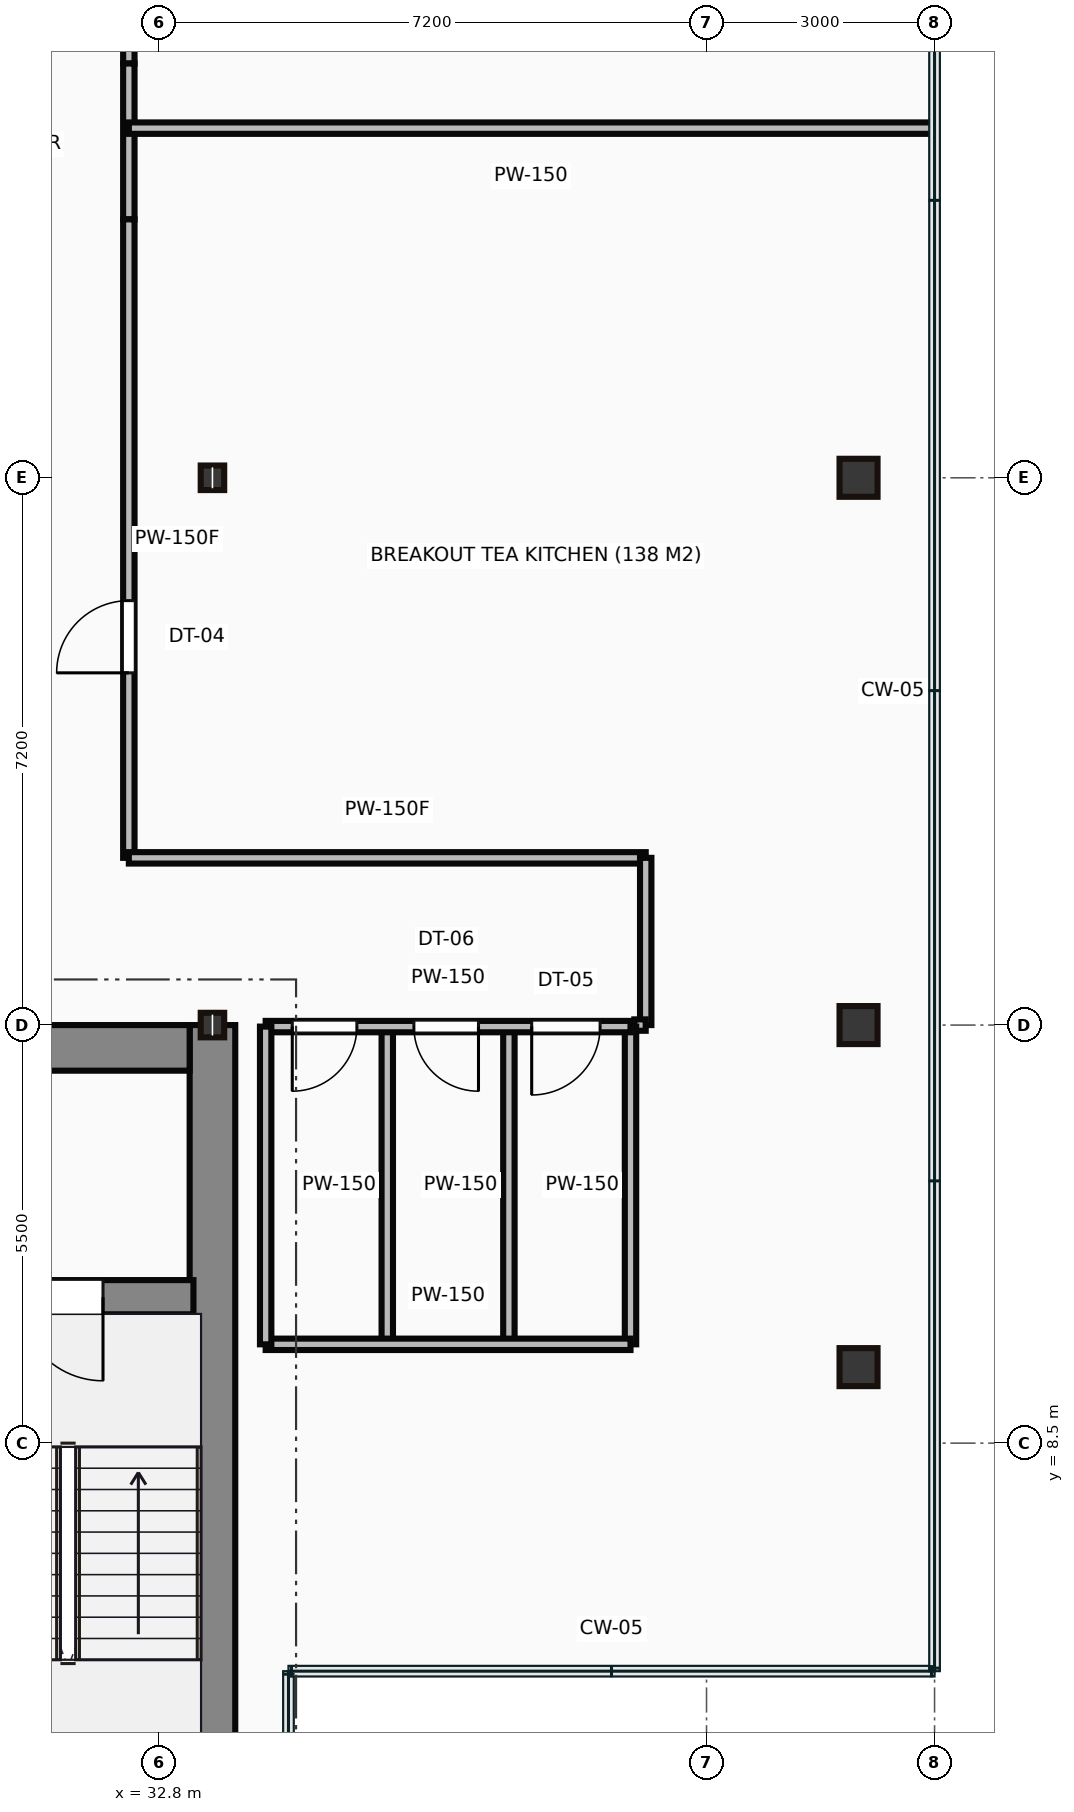
"""IFC4 building model, lengths in metres.
Left out: names, types, materials, properties, quantities, classifications, styles, units other than length and angle.
Written with IfcOpenShell. Run it as: python <this file> out.ifc"""

import sys

from ifc_helpers import new_model, si_unit, direction, frame, frame_2d, origin, origin_2d, place, context, subcontext, project, spatial, rectangle, hollow_rectangle, i_section, extrude, source, transform, mapped, element, fill, save


model = new_model("IFC4")
c1 = context("Model", 3, precision=1e-05, world=origin(), true_north=direction((0.0, 1.0)))
c2 = subcontext(c1, "Body", "Model", "MODEL_VIEW")
j1 = project(units=[si_unit("LENGTHUNIT", "METRE"), si_unit("PLANEANGLEUNIT", "RADIAN")], contexts=[c1])
p1 = place(None, origin())
s1 = spatial("IfcSite", under=j1, at=p1, CompositionType="ELEMENT")
p2 = place(p1, origin())
s2 = spatial("IfcBuilding", under=s1, at=p2, CompositionType="ELEMENT")
p3 = place(p2, frame((0.0, 0.0, 199.55)))
s3 = spatial("IfcBuildingStorey", under=s2, at=p3, CompositionType="ELEMENT", Elevation=199.55)
m1 = source(origin(), c2, "Body", "SweptSolid", [
    extrude(rectangle(XDim=13.1, YDim=0.6, at=frame_2d((6.55, 0.0))), origin(), (0.0, 0.0, 1.0), 3.65),
])
p4 = place(p3, frame((33.5, 0.9, 0.0), z_axis=(0.0, 0.0, 1.0), x_axis=(0.0, 1.0, 0.0)))
e1 = element("IfcWall", 1, at=p4, inside=s3, PredefinedType="SHEAR", context=c2, shape_type="MappedRepresentation", body=[
    mapped(m1, transform((0.0, 0.0, 0.0))),
])
m2 = source(origin(), c2, "Body", "SweptSolid", [
    extrude(rectangle(XDim=12.6, YDim=0.6, at=frame_2d((6.3, 0.0))), origin(), (0.0, 0.0, 1.0), 3.65),
])
p5 = place(p3, frame((20.6, 13.7, 0.0), z_axis=(0.0, 0.0, 1.0), x_axis=(1.0, 0.0, 0.0)))
e2 = element("IfcWall", 2, at=p5, inside=s3, PredefinedType="SHEAR", context=c2, shape_type="MappedRepresentation", body=[
    mapped(m2, transform((0.0, 0.0, 0.0))),
])
p6 = place(p5, frame((9.25, 0.0, 0.0)))
e3 = element("IfcOpeningElement", 3, at=p6, cuts=e2, PredefinedType="OPENING", context=c2, shape_type="SweptSolid", body=[
    extrude(rectangle(XDim=1.1, YDim=2.15, at=frame_2d((0.55, 1.075))), frame((0.0, 0.31, 0.0), z_axis=(0.0, -1.0, 0.0), x_axis=(1.0, 0.0, 0.0)), (0.0, 0.0, 1.0), 0.62),
])
m3 = source(origin(), c2, "Body", "SweptSolid", [
    extrude(rectangle(XDim=3.39, YDim=0.45, at=frame_2d((1.695, 0.0))), origin(), (0.0, 0.0, 1.0), 3.65),
])
p7 = place(p3, frame((29.86, 10.42, 0.0), z_axis=(0.0, 0.0, 1.0), x_axis=(1.0, 0.0, 0.0)))
e4 = element("IfcWall", 4, at=p7, inside=s3, PredefinedType="SHEAR", context=c2, shape_type="MappedRepresentation", body=[
    mapped(m3, transform((0.0, 0.0, 0.0))),
])
p8 = place(p7, frame((1.1, 0.0, 0.0)))
e5 = element("IfcOpeningElement", 5, at=p8, cuts=e4, PredefinedType="OPENING", context=c2, shape_type="SweptSolid", body=[
    extrude(rectangle(XDim=1.1, YDim=2.15, at=frame_2d((0.55, 1.075))), frame((0.0, 0.235, 0.0), z_axis=(0.0, -1.0, 0.0), x_axis=(1.0, 0.0, 0.0)), (0.0, 0.0, 1.0), 0.47),
])
m4 = source(origin(), c2, "Body", "SweptSolid", [
    extrude(i_section(OverallWidth=0.309, OverallDepth=0.323, WebThickness=0.014, FlangeThickness=0.023, at=origin_2d()), origin(), (0.0, 0.0, 1.0), 3.65),
])
for number, where, z_axis, x_axis in (
    (6, (33.5, 14.0, 0.0), (0.0, 0.0, 1.0), (1.0, 0.0, 0.0)),
    (7, (33.5, 21.2, 0.0), (0.0, 0.0, 1.0), (1.0, 0.0, 0.0)),
):
    element("IfcColumn", number, at=place(p3, frame(where, z_axis=z_axis, x_axis=x_axis)), inside=s3, PredefinedType="COLUMN", context=c2, shape_type="MappedRepresentation", body=[
        mapped(m4, transform((0.0, 0.0, 0.0))),
    ])
m5 = source(origin(), c2, "Body", "SweptSolid", [
    extrude(hollow_rectangle(XDim=0.5, YDim=0.5, WallThickness=0.022, at=origin_2d()), origin(), (0.0, 0.0, 1.0), 3.65),
])
for number, where, z_axis, x_axis in (
    (8, (42.0, 9.5, 0.0), (0.0, 0.0, 1.0), (1.0, 0.0, 0.0)),
    (9, (42.0, 14.0, 0.0), (0.0, 0.0, 1.0), (1.0, 0.0, 0.0)),
    (10, (42.0, 21.2, 0.0), (0.0, 0.0, 1.0), (1.0, 0.0, 0.0)),
):
    element("IfcColumn", number, at=place(p3, frame(where, z_axis=z_axis, x_axis=x_axis)), inside=s3, PredefinedType="COLUMN", context=c2, shape_type="MappedRepresentation", body=[
        mapped(m5, transform((0.0, 0.0, 0.0))),
    ])
m6 = source(origin(), c2, "Body", "SweptSolid", [
    extrude(rectangle(XDim=4.8, YDim=0.15, at=frame_2d((2.4, 0.0))), origin(), (0.0, 0.0, 1.0), 2.787),
])
p9 = place(p3, frame((34.2, 13.98, 0.0), z_axis=(0.0, 0.0, 1.0), x_axis=(1.0, 0.0, 0.0)))
e11 = element("IfcWall", 11, at=p9, inside=s3, PredefinedType="PARTITIONING", context=c2, shape_type="MappedRepresentation", body=[
    mapped(m6, transform((0.0, 0.0, 0.0))),
])
p10 = place(p9, frame((0.35, 0.0, 0.0)))
e12 = element("IfcOpeningElement", 12, at=p10, cuts=e11, PredefinedType="OPENING", context=c2, shape_type="SweptSolid", body=[
    extrude(rectangle(XDim=0.85, YDim=2.1, at=frame_2d((0.425, 1.05))), frame((0.0, 0.085, 0.0), z_axis=(0.0, -1.0, 0.0), x_axis=(1.0, 0.0, 0.0)), (0.0, 0.0, 1.0), 0.17),
])
p11 = place(p9, frame((1.95, 0.0, 0.0)))
e13 = element("IfcOpeningElement", 13, at=p11, cuts=e11, PredefinedType="OPENING", context=c2, shape_type="SweptSolid", body=[
    extrude(rectangle(XDim=0.85, YDim=2.1, at=frame_2d((0.425, 1.05))), frame((0.0, 0.085, 0.0), z_axis=(0.0, -1.0, 0.0), x_axis=(1.0, 0.0, 0.0)), (0.0, 0.0, 1.0), 0.17),
])
p12 = place(p9, frame((3.5, 0.0, 0.0)))
e14 = element("IfcOpeningElement", 14, at=p12, cuts=e11, PredefinedType="OPENING", context=c2, shape_type="SweptSolid", body=[
    extrude(rectangle(XDim=0.9, YDim=2.1, at=frame_2d((0.45, 1.05))), frame((0.0, 0.085, 0.0), z_axis=(0.0, -1.0, 0.0), x_axis=(1.0, 0.0, 0.0)), (0.0, 0.0, 1.0), 0.17),
])
m7 = source(origin(), c2, "Body", "SweptSolid", [
    extrude(rectangle(XDim=4.8, YDim=0.15, at=frame_2d((2.4, 0.0))), origin(), (0.0, 0.0, 1.0), 3.4),
])
p13 = place(p3, frame((34.2, 9.8, 0.0), z_axis=(0.0, 0.0, 1.0), x_axis=(1.0, 0.0, 0.0)))
e15 = element("IfcWall", 15, at=p13, inside=s3, PredefinedType="PARTITIONING", context=c2, shape_type="MappedRepresentation", body=[
    mapped(m7, transform((0.0, 0.0, 0.0))),
])
m8 = source(origin(), c2, "Body", "SweptSolid", [
    extrude(rectangle(XDim=4.18, YDim=0.15, at=frame_2d((2.09, 0.0))), origin(), (0.0, 0.0, 1.0), 3.4),
])
for number, where, z_axis, x_axis in (
    (16, (39.0, 9.8, 0.0), (0.0, 0.0, 1.0), (0.0, 1.0, 0.0)),
    (17, (34.2, 9.8, 0.0), (0.0, 0.0, 1.0), (0.0, 1.0, 0.0)),
    (18, (35.8, 9.8, 0.0), (0.0, 0.0, 1.0), (0.0, 1.0, 0.0)),
    (19, (37.4, 9.8, 0.0), (0.0, 0.0, 1.0), (0.0, 1.0, 0.0)),
):
    element("IfcWall", number, at=place(p3, frame(where, z_axis=z_axis, x_axis=x_axis)), inside=s3, PredefinedType="PARTITIONING", context=c2, shape_type="MappedRepresentation", body=[
        mapped(m8, transform((0.0, 0.0, 0.0))),
    ])
m9 = source(origin(), c2, "Body", "SweptSolid", [
    extrude(rectangle(XDim=6.55, YDim=0.15, at=frame_2d((3.275, 0.0))), origin(), (0.0, 0.0, 1.0), 3.4),
])
p14 = place(p3, frame((32.4, 33.2, 0.0), z_axis=(0.0, 0.0, 1.0), x_axis=(0.0, -1.0, 0.0)))
e20 = element("IfcWall", 20, at=p14, inside=s3, PredefinedType="PARTITIONING", context=c2, shape_type="MappedRepresentation", body=[
    mapped(m9, transform((0.0, 0.0, 0.0))),
])
p15 = place(p14, frame((2.8, 0.0, 0.0)))
e21 = element("IfcOpeningElement", 21, at=p15, cuts=e20, PredefinedType="OPENING", context=c2, shape_type="SweptSolid", body=[
    extrude(rectangle(XDim=0.95, YDim=2.15, at=frame_2d((0.475, 1.075))), frame((0.0, 0.085, 0.0), z_axis=(0.0, -1.0, 0.0), x_axis=(1.0, 0.0, 0.0)), (0.0, 0.0, 1.0), 0.17),
])
m10 = source(origin(), c2, "Body", "SweptSolid", [
    extrude(rectangle(XDim=2.05, YDim=0.15, at=frame_2d((1.025, 0.0))), origin(), (0.0, 0.0, 1.0), 3.4),
])
p16 = place(p3, frame((32.4, 26.65, 0.0), z_axis=(0.0, 0.0, 1.0), x_axis=(0.0, -1.0, 0.0)))
e22 = element("IfcWall", 22, at=p16, inside=s3, PredefinedType="PARTITIONING", context=c2, shape_type="MappedRepresentation", body=[
    mapped(m10, transform((0.0, 0.0, 0.0))),
])
m11 = source(origin(), c2, "Body", "SweptSolid", [
    extrude(rectangle(XDim=8.4, YDim=0.15, at=frame_2d((4.2, 0.0))), origin(), (0.0, 0.0, 1.0), 3.4),
])
p17 = place(p3, frame((32.4, 24.6, 0.0), z_axis=(0.0, 0.0, 1.0), x_axis=(0.0, -1.0, 0.0)))
e23 = element("IfcWall", 23, at=p17, inside=s3, PredefinedType="PARTITIONING", context=c2, shape_type="MappedRepresentation", body=[
    mapped(m11, transform((0.0, 0.0, 0.0))),
])
p18 = place(p17, frame((5.016, 0.0, 0.0)))
e24 = element("IfcOpeningElement", 24, at=p18, cuts=e23, PredefinedType="OPENING", context=c2, shape_type="SweptSolid", body=[
    extrude(rectangle(XDim=0.95, YDim=2.15, at=frame_2d((0.475, 1.075))), frame((0.0, 0.085, 0.0), z_axis=(0.0, -1.0, 0.0), x_axis=(1.0, 0.0, 0.0)), (0.0, 0.0, 1.0), 0.17),
])
m12 = source(origin(), c2, "Body", "SweptSolid", [
    extrude(rectangle(XDim=6.8, YDim=0.15, at=frame_2d((3.4, 0.0))), origin(), (0.0, 0.0, 1.0), 3.4),
])
p19 = place(p3, frame((32.4, 16.2, 0.0), z_axis=(0.0, 0.0, 1.0), x_axis=(1.0, 0.0, 0.0)))
e25 = element("IfcWall", 25, at=p19, inside=s3, PredefinedType="PARTITIONING", context=c2, shape_type="MappedRepresentation", body=[
    mapped(m12, transform((0.0, 0.0, 0.0))),
])
m13 = source(origin(), c2, "Body", "SweptSolid", [
    extrude(rectangle(XDim=2.2, YDim=0.15, at=frame_2d((1.1, 0.0))), origin(), (0.0, 0.0, 1.0), 3.4),
])
p20 = place(p3, frame((39.2, 16.2, 0.0), z_axis=(0.0, 0.0, 1.0), x_axis=(0.0, -1.0, 0.0)))
e26 = element("IfcWall", 26, at=p20, inside=s3, PredefinedType="PARTITIONING", context=c2, shape_type="MappedRepresentation", body=[
    mapped(m13, transform((0.0, 0.0, 0.0))),
])
m14 = source(origin(), c2, "Body", "SweptSolid", [
    extrude(rectangle(XDim=0.15, YDim=0.15, at=frame_2d((0.075, 0.0))), origin(), (0.0, 0.0, 1.0), 3.4),
])
p21 = place(p3, frame((39.2, 14.0, 0.0), z_axis=(0.0, 0.0, 1.0), x_axis=(-1.0, 0.0, 0.0)))
e27 = element("IfcWall", 27, at=p21, inside=s3, PredefinedType="PARTITIONING", context=c2, shape_type="MappedRepresentation", body=[
    mapped(m14, transform((0.0, 0.0, 0.0))),
])
m15 = source(origin(), c2, "Body", "SweptSolid", [
    extrude(rectangle(XDim=10.58, YDim=0.15, at=frame_2d((5.29, 0.0))), origin(), (0.0, 0.0, 1.0), 3.4),
])
p22 = place(p3, frame((42.98, 25.8, 0.0), z_axis=(0.0, 0.0, 1.0), x_axis=(-1.0, 0.0, 0.0)))
e28 = element("IfcWall", 28, at=p22, inside=s3, PredefinedType="PARTITIONING", context=c2, shape_type="MappedRepresentation", body=[
    mapped(m15, transform((0.0, 0.0, 0.0))),
])
m16 = source(origin(), c2, "Body", "SweptSolid", [
    extrude(rectangle(XDim=1.1, YDim=2.15, at=frame_2d((0.55, 1.075))), frame((0.0, 0.025, 0.0), z_axis=(0.0, -1.0, 0.0), x_axis=(1.0, 0.0, 0.0)), (0.0, 0.0, 1.0), 0.05),
])
p23 = place(p8, frame((1.1, 0.0, 0.0), z_axis=(0.0, 0.0, 1.0), x_axis=(-1.0, 0.0, 0.0)))
e29 = element("IfcDoor", 29, at=p23, inside=s3, OperationType="SINGLE_SWING_RIGHT", PredefinedType="DOOR", context=c2, shape_type="MappedRepresentation", body=[
    mapped(m16, transform((0.0, 0.0, 0.0))),
])
fill(e5, e29)
m17 = source(origin(), c2, "Body", "SweptSolid", [
    extrude(rectangle(XDim=0.85, YDim=2.1, at=frame_2d((0.425, 1.05))), frame((0.0, 0.025, 0.0), z_axis=(0.0, -1.0, 0.0), x_axis=(1.0, 0.0, 0.0)), (0.0, 0.0, 1.0), 0.05),
])
p24 = place(p10, frame((0.85, 0.0, 0.0), z_axis=(0.0, 0.0, 1.0), x_axis=(-1.0, 0.0, 0.0)))
e30 = element("IfcDoor", 30, at=p24, inside=s3, OperationType="SINGLE_SWING_LEFT", PredefinedType="DOOR", context=c2, shape_type="MappedRepresentation", body=[
    mapped(m17, transform((0.0, 0.0, 0.0))),
])
fill(e12, e30)
p25 = place(p11, frame((0.85, 0.0, 0.0), z_axis=(0.0, 0.0, 1.0), x_axis=(-1.0, 0.0, 0.0)))
e31 = element("IfcDoor", 31, at=p25, inside=s3, OperationType="SINGLE_SWING_RIGHT", PredefinedType="DOOR", context=c2, shape_type="MappedRepresentation", body=[
    mapped(m17, transform((0.0, 0.0, 0.0))),
])
fill(e13, e31)
m18 = source(origin(), c2, "Body", "SweptSolid", [
    extrude(rectangle(XDim=0.9, YDim=2.1, at=frame_2d((0.45, 1.05))), frame((0.0, 0.025, 0.0), z_axis=(0.0, -1.0, 0.0), x_axis=(1.0, 0.0, 0.0)), (0.0, 0.0, 1.0), 0.05),
])
p26 = place(p12, frame((0.9, 0.0, 0.0), z_axis=(0.0, 0.0, 1.0), x_axis=(-1.0, 0.0, 0.0)))
e32 = element("IfcDoor", 32, at=p26, inside=s3, OperationType="SINGLE_SWING_LEFT", PredefinedType="DOOR", context=c2, shape_type="MappedRepresentation", body=[
    mapped(m18, transform((0.0, 0.0, 0.0))),
])
fill(e14, e32)
m19 = source(origin(), c2, "Body", "SweptSolid", [
    extrude(rectangle(XDim=0.95, YDim=2.15, at=frame_2d((0.475, 1.075))), frame((0.0, 0.025, 0.0), z_axis=(0.0, -1.0, 0.0), x_axis=(1.0, 0.0, 0.0)), (0.0, 0.0, 1.0), 0.05),
])
p27 = place(p18, origin())
e33 = element("IfcDoor", 33, at=p27, inside=s3, OperationType="SINGLE_SWING_RIGHT", PredefinedType="DOOR", context=c2, shape_type="MappedRepresentation", body=[
    mapped(m19, transform((0.0, 0.0, 0.0))),
])
fill(e24, e33)
save(model, sys.argv[1])
